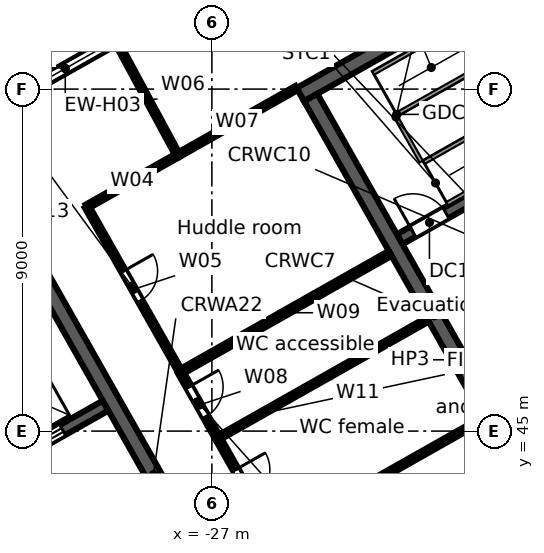
"""IFC4 building model, lengths in metres.
Left out: names, types, materials, properties, quantities, classifications, styles, units other than length and angle.
Written with IfcOpenShell. Run it as: python <this file> out.ifc"""

import sys

from ifc_helpers import new_model, si_unit, direction, frame, frame_2d, origin, place, context, subcontext, project, spatial, rectangle, extrude, element, fill, save


model = new_model("IFC4")
c1 = context("Model", 3, precision=1e-05, world=origin(), true_north=direction((0.0, 1.0)))
c2 = subcontext(c1, "Body", "Model", "MODEL_VIEW")
j1 = project(units=[si_unit("LENGTHUNIT", "METRE"), si_unit("PLANEANGLEUNIT", "RADIAN")], contexts=[c1])
p1 = place(None, origin())
s1 = spatial("IfcSite", under=j1, at=p1, CompositionType="ELEMENT")
p2 = place(p1, origin())
s2 = spatial("IfcBuilding", under=s1, at=p2, CompositionType="ELEMENT")
p3 = place(p2, frame((0.0, 0.0, 274.1)))
s3 = spatial("IfcBuildingStorey", under=s2, at=p3, CompositionType="ELEMENT", Elevation=274.1)
p4 = place(p3, frame((-58.732, 38.771, 0.0), z_axis=(0.0, 0.0, 1.0), x_axis=(0.870355615581, 0.492423702137, 0.0)))
e1 = element("IfcWall", 1, at=p4, inside=s3, PredefinedType="STANDARD", context=c2, shape_type="SweptSolid", body=[
    extrude(rectangle(XDim=64.052, YDim=0.25, at=frame_2d((32.026, 0.0))), origin(), (0.0, 0.0, 1.0), 3.52),
])
p5 = place(p4, frame((61.259, 0.0, 0.8)))
e2 = element("IfcOpeningElement", 2, at=p5, cuts=e1, PredefinedType="OPENING", context=c2, shape_type="SweptSolid", body=[
    extrude(rectangle(XDim=2.4, YDim=2.2, at=frame_2d((1.2, 1.1))), frame((0.0, 0.135, 0.0), z_axis=(0.0, -1.0, 0.0), x_axis=(1.0, 0.0, 0.0)), (0.0, 0.0, 1.0), 0.27),
])
p6 = place(p4, frame((58.216, 0.0, 0.8)))
e3 = element("IfcOpeningElement", 3, at=p6, cuts=e1, PredefinedType="OPENING", context=c2, shape_type="SweptSolid", body=[
    extrude(rectangle(XDim=2.4, YDim=2.2, at=frame_2d((1.2, 1.1))), frame((0.0, 0.135, 0.0), z_axis=(0.0, -1.0, 0.0), x_axis=(1.0, 0.0, 0.0)), (0.0, 0.0, 1.0), 0.27),
])
p7 = place(p4, frame((55.173, 0.0, 0.8)))
e4 = element("IfcOpeningElement", 4, at=p7, cuts=e1, PredefinedType="OPENING", context=c2, shape_type="SweptSolid", body=[
    extrude(rectangle(XDim=2.4, YDim=2.2, at=frame_2d((1.2, 1.1))), frame((0.0, 0.135, 0.0), z_axis=(0.0, -1.0, 0.0), x_axis=(1.0, 0.0, 0.0)), (0.0, 0.0, 1.0), 0.27),
])
p8 = place(p4, frame((52.129, 0.0, 0.8)))
e5 = element("IfcOpeningElement", 5, at=p8, cuts=e1, PredefinedType="OPENING", context=c2, shape_type="SweptSolid", body=[
    extrude(rectangle(XDim=2.4, YDim=2.2, at=frame_2d((1.2, 1.1))), frame((0.0, 0.135, 0.0), z_axis=(0.0, -1.0, 0.0), x_axis=(1.0, 0.0, 0.0)), (0.0, 0.0, 1.0), 0.27),
])
p9 = place(p4, frame((49.086, 0.0, 0.8)))
e6 = element("IfcOpeningElement", 6, at=p9, cuts=e1, PredefinedType="OPENING", context=c2, shape_type="SweptSolid", body=[
    extrude(rectangle(XDim=2.4, YDim=2.2, at=frame_2d((1.2, 1.1))), frame((0.0, 0.135, 0.0), z_axis=(0.0, -1.0, 0.0), x_axis=(1.0, 0.0, 0.0)), (0.0, 0.0, 1.0), 0.27),
])
p10 = place(p4, frame((46.043, 0.0, 0.8)))
e7 = element("IfcOpeningElement", 7, at=p10, cuts=e1, PredefinedType="OPENING", context=c2, shape_type="SweptSolid", body=[
    extrude(rectangle(XDim=2.4, YDim=2.2, at=frame_2d((1.2, 1.1))), frame((0.0, 0.135, 0.0), z_axis=(0.0, -1.0, 0.0), x_axis=(1.0, 0.0, 0.0)), (0.0, 0.0, 1.0), 0.27),
])
p11 = place(p4, frame((43.0, 0.0, 0.8)))
e8 = element("IfcOpeningElement", 8, at=p11, cuts=e1, PredefinedType="OPENING", context=c2, shape_type="SweptSolid", body=[
    extrude(rectangle(XDim=2.4, YDim=2.2, at=frame_2d((1.2, 1.1))), frame((0.0, 0.135, 0.0), z_axis=(0.0, -1.0, 0.0), x_axis=(1.0, 0.0, 0.0)), (0.0, 0.0, 1.0), 0.27),
])
p12 = place(p4, frame((39.956, 0.0, 0.8)))
e9 = element("IfcOpeningElement", 9, at=p12, cuts=e1, PredefinedType="OPENING", context=c2, shape_type="SweptSolid", body=[
    extrude(rectangle(XDim=2.4, YDim=2.2, at=frame_2d((1.2, 1.1))), frame((0.0, 0.135, 0.0), z_axis=(0.0, -1.0, 0.0), x_axis=(1.0, 0.0, 0.0)), (0.0, 0.0, 1.0), 0.27),
])
p13 = place(p4, frame((36.913, 0.0, 0.8)))
e10 = element("IfcOpeningElement", 10, at=p13, cuts=e1, PredefinedType="OPENING", context=c2, shape_type="SweptSolid", body=[
    extrude(rectangle(XDim=2.4, YDim=2.2, at=frame_2d((1.2, 1.1))), frame((0.0, 0.135, 0.0), z_axis=(0.0, -1.0, 0.0), x_axis=(1.0, 0.0, 0.0)), (0.0, 0.0, 1.0), 0.27),
])
p14 = place(p4, frame((33.87, 0.0, 0.8)))
e11 = element("IfcOpeningElement", 11, at=p14, cuts=e1, PredefinedType="OPENING", context=c2, shape_type="SweptSolid", body=[
    extrude(rectangle(XDim=2.4, YDim=2.2, at=frame_2d((1.2, 1.1))), frame((0.0, 0.135, 0.0), z_axis=(0.0, -1.0, 0.0), x_axis=(1.0, 0.0, 0.0)), (0.0, 0.0, 1.0), 0.27),
])
p15 = place(p4, frame((30.826, 0.0, 0.8)))
e12 = element("IfcOpeningElement", 12, at=p15, cuts=e1, PredefinedType="OPENING", context=c2, shape_type="SweptSolid", body=[
    extrude(rectangle(XDim=2.4, YDim=2.2, at=frame_2d((1.2, 1.1))), frame((0.0, 0.135, 0.0), z_axis=(0.0, -1.0, 0.0), x_axis=(1.0, 0.0, 0.0)), (0.0, 0.0, 1.0), 0.27),
])
p16 = place(p4, frame((27.783, 0.0, 0.8)))
e13 = element("IfcOpeningElement", 13, at=p16, cuts=e1, PredefinedType="OPENING", context=c2, shape_type="SweptSolid", body=[
    extrude(rectangle(XDim=2.4, YDim=2.2, at=frame_2d((1.2, 1.1))), frame((0.0, 0.135, 0.0), z_axis=(0.0, -1.0, 0.0), x_axis=(1.0, 0.0, 0.0)), (0.0, 0.0, 1.0), 0.27),
])
p17 = place(p4, frame((24.74, 0.0, 0.8)))
e14 = element("IfcOpeningElement", 14, at=p17, cuts=e1, PredefinedType="OPENING", context=c2, shape_type="SweptSolid", body=[
    extrude(rectangle(XDim=2.4, YDim=2.2, at=frame_2d((1.2, 1.1))), frame((0.0, 0.135, 0.0), z_axis=(0.0, -1.0, 0.0), x_axis=(1.0, 0.0, 0.0)), (0.0, 0.0, 1.0), 0.27),
])
p18 = place(p4, frame((21.696, 0.0, 0.8)))
e15 = element("IfcOpeningElement", 15, at=p18, cuts=e1, PredefinedType="OPENING", context=c2, shape_type="SweptSolid", body=[
    extrude(rectangle(XDim=2.4, YDim=2.2, at=frame_2d((1.2, 1.1))), frame((0.0, 0.135, 0.0), z_axis=(0.0, -1.0, 0.0), x_axis=(1.0, 0.0, 0.0)), (0.0, 0.0, 1.0), 0.27),
])
p19 = place(p4, frame((18.653, 0.0, 0.8)))
e16 = element("IfcOpeningElement", 16, at=p19, cuts=e1, PredefinedType="OPENING", context=c2, shape_type="SweptSolid", body=[
    extrude(rectangle(XDim=2.4, YDim=2.2, at=frame_2d((1.2, 1.1))), frame((0.0, 0.135, 0.0), z_axis=(0.0, -1.0, 0.0), x_axis=(1.0, 0.0, 0.0)), (0.0, 0.0, 1.0), 0.27),
])
p20 = place(p4, frame((15.61, 0.0, 0.8)))
e17 = element("IfcOpeningElement", 17, at=p20, cuts=e1, PredefinedType="OPENING", context=c2, shape_type="SweptSolid", body=[
    extrude(rectangle(XDim=2.4, YDim=2.2, at=frame_2d((1.2, 1.1))), frame((0.0, 0.135, 0.0), z_axis=(0.0, -1.0, 0.0), x_axis=(1.0, 0.0, 0.0)), (0.0, 0.0, 1.0), 0.27),
])
p21 = place(p4, frame((12.567, 0.0, 0.8)))
e18 = element("IfcOpeningElement", 18, at=p21, cuts=e1, PredefinedType="OPENING", context=c2, shape_type="SweptSolid", body=[
    extrude(rectangle(XDim=2.4, YDim=2.2, at=frame_2d((1.2, 1.1))), frame((0.0, 0.135, 0.0), z_axis=(0.0, -1.0, 0.0), x_axis=(1.0, 0.0, 0.0)), (0.0, 0.0, 1.0), 0.27),
])
p22 = place(p4, frame((9.523, 0.0, 0.8)))
e19 = element("IfcOpeningElement", 19, at=p22, cuts=e1, PredefinedType="OPENING", context=c2, shape_type="SweptSolid", body=[
    extrude(rectangle(XDim=2.4, YDim=2.2, at=frame_2d((1.2, 1.1))), frame((0.0, 0.135, 0.0), z_axis=(0.0, -1.0, 0.0), x_axis=(1.0, 0.0, 0.0)), (0.0, 0.0, 1.0), 0.27),
])
p23 = place(p4, frame((6.48, 0.0, 0.8)))
e20 = element("IfcOpeningElement", 20, at=p23, cuts=e1, PredefinedType="OPENING", context=c2, shape_type="SweptSolid", body=[
    extrude(rectangle(XDim=2.4, YDim=2.2, at=frame_2d((1.2, 1.1))), frame((0.0, 0.135, 0.0), z_axis=(0.0, -1.0, 0.0), x_axis=(1.0, 0.0, 0.0)), (0.0, 0.0, 1.0), 0.27),
])
p24 = place(p4, frame((3.437, 0.0, 0.8)))
e21 = element("IfcOpeningElement", 21, at=p24, cuts=e1, PredefinedType="OPENING", context=c2, shape_type="SweptSolid", body=[
    extrude(rectangle(XDim=2.4, YDim=2.2, at=frame_2d((1.2, 1.1))), frame((0.0, 0.135, 0.0), z_axis=(0.0, -1.0, 0.0), x_axis=(1.0, 0.0, 0.0)), (0.0, 0.0, 1.0), 0.27),
])
p25 = place(p4, frame((0.393, 0.0, 0.8)))
e22 = element("IfcOpeningElement", 22, at=p25, cuts=e1, PredefinedType="OPENING", context=c2, shape_type="SweptSolid", body=[
    extrude(rectangle(XDim=2.4, YDim=2.2, at=frame_2d((1.2, 1.1))), frame((0.0, 0.135, 0.0), z_axis=(0.0, -1.0, 0.0), x_axis=(1.0, 0.0, 0.0)), (0.0, 0.0, 1.0), 0.27),
])
p26 = place(p3, frame((-3.017, 46.293, 0.0), z_axis=(0.0, 0.0, 1.0), x_axis=(-0.870355474887, -0.492423950812, 0.0)))
e23 = element("IfcWall", 23, at=p26, inside=s3, PredefinedType="STANDARD", context=c2, shape_type="SweptSolid", body=[
    extrude(rectangle(XDim=40.34, YDim=0.25, at=frame_2d((20.17, 0.0))), origin(), (0.0, 0.0, 1.0), 3.52),
])
p27 = place(p26, frame((37.428, 0.0, 0.8)))
e24 = element("IfcOpeningElement", 24, at=p27, cuts=e23, PredefinedType="OPENING", context=c2, shape_type="SweptSolid", body=[
    extrude(rectangle(XDim=2.4, YDim=2.2, at=frame_2d((1.2, 1.1))), frame((0.0, 0.135, 0.0), z_axis=(0.0, -1.0, 0.0), x_axis=(1.0, 0.0, 0.0)), (0.0, 0.0, 1.0), 0.27),
])
p28 = place(p26, frame((34.372, 0.0, 0.0)))
e25 = element("IfcOpeningElement", 25, at=p28, cuts=e23, PredefinedType="OPENING", context=c2, shape_type="SweptSolid", body=[
    extrude(rectangle(XDim=1.8, YDim=2.4, at=frame_2d((0.9, 1.2))), frame((0.0, 0.135, 0.0), z_axis=(0.0, -1.0, 0.0), x_axis=(1.0, 0.0, 0.0)), (0.0, 0.0, 1.0), 0.27),
])
p29 = place(p26, frame((30.716, 0.0, 0.8)))
e26 = element("IfcOpeningElement", 26, at=p29, cuts=e23, PredefinedType="OPENING", context=c2, shape_type="SweptSolid", body=[
    extrude(rectangle(XDim=2.4, YDim=2.2, at=frame_2d((1.2, 1.1))), frame((0.0, 0.135, 0.0), z_axis=(0.0, -1.0, 0.0), x_axis=(1.0, 0.0, 0.0)), (0.0, 0.0, 1.0), 0.27),
])
p30 = place(p26, frame((27.36, 0.0, 0.8)))
e27 = element("IfcOpeningElement", 27, at=p30, cuts=e23, PredefinedType="OPENING", context=c2, shape_type="SweptSolid", body=[
    extrude(rectangle(XDim=2.4, YDim=2.2, at=frame_2d((1.2, 1.1))), frame((0.0, 0.135, 0.0), z_axis=(0.0, -1.0, 0.0), x_axis=(1.0, 0.0, 0.0)), (0.0, 0.0, 1.0), 0.27),
])
p31 = place(p26, frame((24.304, 0.0, 0.0)))
e28 = element("IfcOpeningElement", 28, at=p31, cuts=e23, PredefinedType="OPENING", context=c2, shape_type="SweptSolid", body=[
    extrude(rectangle(XDim=1.8, YDim=2.4, at=frame_2d((0.9, 1.2))), frame((0.0, 0.135, 0.0), z_axis=(0.0, -1.0, 0.0), x_axis=(1.0, 0.0, 0.0)), (0.0, 0.0, 1.0), 0.27),
])
p32 = place(p26, frame((20.648, 0.0, 0.8)))
e29 = element("IfcOpeningElement", 29, at=p32, cuts=e23, PredefinedType="OPENING", context=c2, shape_type="SweptSolid", body=[
    extrude(rectangle(XDim=2.4, YDim=2.2, at=frame_2d((1.2, 1.1))), frame((0.0, 0.135, 0.0), z_axis=(0.0, -1.0, 0.0), x_axis=(1.0, 0.0, 0.0)), (0.0, 0.0, 1.0), 0.27),
])
p33 = place(p26, frame((17.292, 0.0, 0.8)))
e30 = element("IfcOpeningElement", 30, at=p33, cuts=e23, PredefinedType="OPENING", context=c2, shape_type="SweptSolid", body=[
    extrude(rectangle(XDim=2.4, YDim=2.2, at=frame_2d((1.2, 1.1))), frame((0.0, 0.135, 0.0), z_axis=(0.0, -1.0, 0.0), x_axis=(1.0, 0.0, 0.0)), (0.0, 0.0, 1.0), 0.27),
])
p34 = place(p26, frame((14.236, 0.0, 0.0)))
e31 = element("IfcOpeningElement", 31, at=p34, cuts=e23, PredefinedType="OPENING", context=c2, shape_type="SweptSolid", body=[
    extrude(rectangle(XDim=1.8, YDim=2.4, at=frame_2d((0.9, 1.2))), frame((0.0, 0.135, 0.0), z_axis=(0.0, -1.0, 0.0), x_axis=(1.0, 0.0, 0.0)), (0.0, 0.0, 1.0), 0.27),
])
p35 = place(p26, frame((10.58, 0.0, 0.8)))
e32 = element("IfcOpeningElement", 32, at=p35, cuts=e23, PredefinedType="OPENING", context=c2, shape_type="SweptSolid", body=[
    extrude(rectangle(XDim=2.4, YDim=2.2, at=frame_2d((1.2, 1.1))), frame((0.0, 0.135, 0.0), z_axis=(0.0, -1.0, 0.0), x_axis=(1.0, 0.0, 0.0)), (0.0, 0.0, 1.0), 0.27),
])
p36 = place(p26, frame((7.224, 0.0, 0.8)))
e33 = element("IfcOpeningElement", 33, at=p36, cuts=e23, PredefinedType="OPENING", context=c2, shape_type="SweptSolid", body=[
    extrude(rectangle(XDim=2.4, YDim=2.2, at=frame_2d((1.2, 1.1))), frame((0.0, 0.135, 0.0), z_axis=(0.0, -1.0, 0.0), x_axis=(1.0, 0.0, 0.0)), (0.0, 0.0, 1.0), 0.27),
])
p37 = place(p26, frame((4.168, 0.0, 0.0)))
e34 = element("IfcOpeningElement", 34, at=p37, cuts=e23, PredefinedType="OPENING", context=c2, shape_type="SweptSolid", body=[
    extrude(rectangle(XDim=1.8, YDim=2.4, at=frame_2d((0.9, 1.2))), frame((0.0, 0.135, 0.0), z_axis=(0.0, -1.0, 0.0), x_axis=(1.0, 0.0, 0.0)), (0.0, 0.0, 1.0), 0.27),
])
p38 = place(p26, frame((0.512, 0.0, 0.8)))
e35 = element("IfcOpeningElement", 35, at=p38, cuts=e23, PredefinedType="OPENING", context=c2, shape_type="SweptSolid", body=[
    extrude(rectangle(XDim=2.4, YDim=2.2, at=frame_2d((1.2, 1.1))), frame((0.0, 0.135, 0.0), z_axis=(0.0, -1.0, 0.0), x_axis=(1.0, 0.0, 0.0)), (0.0, 0.0, 1.0), 0.27),
])
p39 = place(p3, frame((-37.282, 41.435, 0.0), z_axis=(0.0, 0.0, 1.0), x_axis=(0.870361315115, 0.492413628113, 0.0)))
e36 = element("IfcWall", 36, at=p39, inside=s3, PredefinedType="SOLIDWALL", context=c2, shape_type="SweptSolid", body=[
    extrude(rectangle(XDim=8.6, YDim=0.3, at=frame_2d((4.3, 0.0))), origin(), (0.0, 0.0, 1.0), 3.52),
])
p40 = place(p39, frame((0.65, 0.0, 0.0)))
e37 = element("IfcOpeningElement", 37, at=p40, cuts=e36, PredefinedType="OPENING", context=c2, shape_type="SweptSolid", body=[
    extrude(rectangle(XDim=1.1, YDim=2.1, at=frame_2d((0.55, 1.05))), frame((0.0, 0.16, 0.0), z_axis=(0.0, -1.0, 0.0), x_axis=(1.0, 0.0, 0.0)), (0.0, 0.0, 1.0), 0.32),
])
p41 = place(p39, frame((3.05, 0.0, 0.0)))
e38 = element("IfcOpeningElement", 38, at=p41, cuts=e36, PredefinedType="OPENING", context=c2, shape_type="SweptSolid", body=[
    extrude(rectangle(XDim=1.1, YDim=2.1, at=frame_2d((0.55, 1.05))), frame((0.0, 0.16, 0.0), z_axis=(0.0, -1.0, 0.0), x_axis=(1.0, 0.0, 0.0)), (0.0, 0.0, 1.0), 0.32),
])
p42 = place(p39, frame((6.2, 0.0, 0.0)))
e39 = element("IfcOpeningElement", 39, at=p42, cuts=e36, PredefinedType="OPENING", context=c2, shape_type="SweptSolid", body=[
    extrude(rectangle(XDim=1.1, YDim=2.1, at=frame_2d((0.55, 1.05))), frame((0.0, 0.16, 0.0), z_axis=(0.0, -1.0, 0.0), x_axis=(1.0, 0.0, 0.0)), (0.0, 0.0, 1.0), 0.32),
])
p43 = place(p3, frame((-31.79, 49.597, 0.0), z_axis=(0.0, 0.0, 1.0), x_axis=(0.492421663121, -0.870356769198, 0.0)))
e40 = element("IfcWall", 40, at=p43, inside=s3, PredefinedType="SOLIDWALL", context=c2, shape_type="SweptSolid", body=[
    extrude(rectangle(XDim=13.2, YDim=0.4, at=frame_2d((6.6, 0.0))), origin(), (0.0, 0.0, 1.0), 3.52),
])
p44 = place(p3, frame((-22.059, 50.047, 0.0), z_axis=(0.0, 0.0, 1.0), x_axis=(0.87035077051, 0.49243226567, 0.0)))
e41 = element("IfcWall", 41, at=p44, inside=s3, PredefinedType="SOLIDWALL", context=c2, shape_type="SweptSolid", body=[
    extrude(rectangle(XDim=7.4, YDim=0.3, at=frame_2d((3.7, 0.0))), origin(), (0.0, 0.0, 1.0), 3.52),
])
p45 = place(p44, frame((0.4, 0.0, 0.0)))
e42 = element("IfcOpeningElement", 42, at=p45, cuts=e41, PredefinedType="OPENING", context=c2, shape_type="SweptSolid", body=[
    extrude(rectangle(XDim=1.0, YDim=2.1, at=frame_2d((0.5, 1.05))), frame((0.0, 0.16, 0.0), z_axis=(0.0, -1.0, 0.0), x_axis=(1.0, 0.0, 0.0)), (0.0, 0.0, 1.0), 0.32),
])
p46 = place(p3, frame((-24.672, 53.854, 0.0), z_axis=(0.0, 0.0, 1.0), x_axis=(0.870353598469, 0.492427267353, 0.0)))
e43 = element("IfcWall", 43, at=p46, inside=s3, PredefinedType="SOLIDWALL", context=c2, shape_type="SweptSolid", body=[
    extrude(rectangle(XDim=15.0, YDim=0.4, at=frame_2d((7.5, 0.0))), origin(), (0.0, 0.0, 1.0), 3.52),
])
p47 = place(p3, frame((-24.4, 53.779, 0.0), z_axis=(0.0, 0.0, 1.0), x_axis=(0.492421663121, -0.870356769198, 0.0)))
e44 = element("IfcWall", 44, at=p47, inside=s3, PredefinedType="SOLIDWALL", context=c2, shape_type="SweptSolid", body=[
    extrude(rectangle(XDim=13.2, YDim=0.4, at=frame_2d((6.6, 0.0))), origin(), (0.0, 0.0, 1.0), 3.52),
])
p48 = place(p3, frame((-30.289, 50.906, 0.0), z_axis=(0.0, 0.0, 1.0), x_axis=(0.870344460795, 0.492443417626, 0.0)))
e45 = element("IfcWall", 45, at=p48, inside=s3, PredefinedType="PARTITIONING", context=c2, shape_type="SweptSolid", body=[
    extrude(rectangle(XDim=2.75, YDim=0.125, at=frame_2d((1.375, 0.0))), origin(), (0.0, 0.0, 1.0), 3.52),
])
p49 = place(p3, frame((-30.289, 50.906, 0.0), z_axis=(0.0, 0.0, 1.0), x_axis=(0.492406341242, -0.870365437678, 0.0)))
e46 = element("IfcWall", 46, at=p49, inside=s3, PredefinedType="PARTITIONING", context=c2, shape_type="SweptSolid", body=[
    extrude(rectangle(XDim=5.0, YDim=0.125, at=frame_2d((2.5, 0.0))), origin(), (0.0, 0.0, 1.0), 3.52),
])
p50 = place(p49, frame((1.95, 0.0, 0.0)))
e47 = element("IfcOpeningElement", 47, at=p50, cuts=e46, PredefinedType="OPENING", context=c2, shape_type="SweptSolid", body=[
    extrude(rectangle(XDim=0.9, YDim=2.1, at=frame_2d((0.45, 1.05))), frame((0.0, 0.073, 0.0), z_axis=(0.0, -1.0, 0.0), x_axis=(1.0, 0.0, 0.0)), (0.0, 0.0, 1.0), 0.145),
])
p51 = place(p3, frame((-29.474, 55.181, 0.0), z_axis=(0.0, 0.0, 1.0), x_axis=(0.475344759365, -0.879799613403, 0.0)))
e48 = element("IfcWall", 48, at=p51, inside=s3, PredefinedType="PARTITIONING", context=c2, shape_type="SweptSolid", body=[
    extrude(rectangle(XDim=3.32, YDim=0.125, at=frame_2d((1.66, 0.0))), origin(), (0.0, 0.0, 1.0), 2.888),
])
p52 = place(p3, frame((-27.896, 52.26, 0.0), z_axis=(0.0, 0.0, 1.0), x_axis=(0.870352535776, 0.492429145632, 0.0)))
e49 = element("IfcWall", 49, at=p52, inside=s3, PredefinedType="PARTITIONING", context=c2, shape_type="SweptSolid", body=[
    extrude(rectangle(XDim=3.591, YDim=0.125, at=frame_2d((1.795, 0.0))), origin(), (0.0, 0.0, 1.0), 2.792),
])
p53 = place(p3, frame((-27.827, 46.554, 0.0), z_axis=(0.0, 0.0, 1.0), x_axis=(0.492374954878, -0.870383193662, 0.0)))
e50 = element("IfcWall", 50, at=p53, inside=s3, PredefinedType="PARTITIONING", context=c2, shape_type="SweptSolid", body=[
    extrude(rectangle(XDim=2.0, YDim=0.15, at=frame_2d((1.0, 0.0))), origin(), (0.0, 0.0, 1.0), 2.792),
])
p54 = place(p53, frame((0.45, 0.0, 0.0)))
e51 = element("IfcOpeningElement", 51, at=p54, cuts=e50, PredefinedType="OPENING", context=c2, shape_type="SweptSolid", body=[
    extrude(rectangle(XDim=0.9, YDim=2.1, at=frame_2d((0.45, 1.05))), frame((0.0, 0.085, 0.0), z_axis=(0.0, -1.0, 0.0), x_axis=(1.0, 0.0, 0.0)), (0.0, 0.0, 1.0), 0.17),
])
p55 = place(p3, frame((-27.827, 46.554, 0.0), z_axis=(0.0, 0.0, 1.0), x_axis=(0.870339695563, 0.492451839602, 0.0)))
e52 = element("IfcWall", 52, at=p55, inside=s3, PredefinedType="PARTITIONING", context=c2, shape_type="SweptSolid", body=[
    extrude(rectangle(XDim=6.34, YDim=0.15, at=frame_2d((3.17, 0.0))), origin(), (0.0, 0.0, 1.0), 2.792),
])
p56 = place(p3, frame((-26.842, 44.813, 0.0), z_axis=(0.0, 0.0, 1.0), x_axis=(0.492365617434, -0.870388475779, 0.0)))
e53 = element("IfcWall", 53, at=p56, inside=s3, PredefinedType="PARTITIONING", context=c2, shape_type="SweptSolid", body=[
    extrude(rectangle(XDim=3.0, YDim=0.15, at=frame_2d((1.5, 0.0))), origin(), (0.0, 0.0, 1.0), 2.792),
])
p57 = place(p56, frame((0.95, 0.0, 0.0)))
e54 = element("IfcOpeningElement", 54, at=p57, cuts=e53, PredefinedType="OPENING", context=c2, shape_type="SweptSolid", body=[
    extrude(rectangle(XDim=0.9, YDim=2.1, at=frame_2d((0.45, 1.05))), frame((0.0, 0.085, 0.0), z_axis=(0.0, -1.0, 0.0), x_axis=(1.0, 0.0, 0.0)), (0.0, 0.0, 1.0), 0.17),
])
p58 = place(p3, frame((-26.842, 44.813, 0.0), z_axis=(0.0, 0.0, 1.0), x_axis=(0.870283015025, 0.492552001071, 0.0)))
e55 = element("IfcWall", 55, at=p58, inside=s3, PredefinedType="PARTITIONING", context=c2, shape_type="SweptSolid", body=[
    extrude(rectangle(XDim=6.341, YDim=0.125, at=frame_2d((3.17, 0.0))), origin(), (0.0, 0.0, 1.0), 2.792),
])
p59 = place(p3, frame((-25.365, 42.202, 0.0), z_axis=(0.0, 0.0, 1.0), x_axis=(0.870320373616, 0.492485986875, 0.0)))
e56 = element("IfcWall", 56, at=p59, inside=s3, PredefinedType="PARTITIONING", context=c2, shape_type="SweptSolid", body=[
    extrude(rectangle(XDim=6.341, YDim=0.125, at=frame_2d((3.171, 0.0))), origin(), (0.0, 0.0, 1.0), 3.52),
])
p60 = place(p15, origin())
e57 = element("IfcWindow", 57, at=p60, inside=s3, PartitioningType="SINGLE_PANEL", PredefinedType="WINDOW", context=c2, shape_type="SweptSolid", body=[
    extrude(rectangle(XDim=2.4, YDim=2.2, at=frame_2d((1.2, 1.1))), frame((0.0, 0.03, 0.0), z_axis=(0.0, -1.0, 0.0), x_axis=(1.0, 0.0, 0.0)), (0.0, 0.0, 1.0), 0.06),
])
fill(e12, e57)
p61 = place(p42, origin())
e58 = element("IfcDoor", 58, at=p61, inside=s3, OperationType="DOUBLE_DOOR_SLIDING", PredefinedType="DOOR", context=c2, shape_type="SweptSolid", body=[
    extrude(rectangle(XDim=1.1, YDim=2.1, at=frame_2d((0.55, 1.05))), frame((0.0, 0.025, 0.0), z_axis=(0.0, -1.0, 0.0), x_axis=(1.0, 0.0, 0.0)), (0.0, 0.0, 1.0), 0.05),
])
fill(e39, e58)
p62 = place(p45, origin())
e59 = element("IfcDoor", 59, at=p62, inside=s3, OperationType="SINGLE_SWING_LEFT", PredefinedType="DOOR", context=c2, shape_type="SweptSolid", body=[
    extrude(rectangle(XDim=1.0, YDim=2.1, at=frame_2d((0.5, 1.05))), frame((0.0, 0.025, 0.0), z_axis=(0.0, -1.0, 0.0), x_axis=(1.0, 0.0, 0.0)), (0.0, 0.0, 1.0), 0.05),
])
fill(e42, e59)
p63 = place(p50, origin())
e60 = element("IfcDoor", 60, at=p63, inside=s3, OperationType="SINGLE_SWING_LEFT", PredefinedType="DOOR", context=c2, shape_type="SweptSolid", body=[
    extrude(rectangle(XDim=0.9, YDim=2.1, at=frame_2d((0.45, 1.05))), frame((0.0, 0.025, 0.0), z_axis=(0.0, -1.0, 0.0), x_axis=(1.0, 0.0, 0.0)), (0.0, 0.0, 1.0), 0.05),
])
fill(e47, e60)
p64 = place(p57, origin())
e61 = element("IfcDoor", 61, at=p64, inside=s3, OperationType="SINGLE_SWING_LEFT", PredefinedType="DOOR", context=c2, shape_type="SweptSolid", body=[
    extrude(rectangle(XDim=0.9, YDim=2.1, at=frame_2d((0.45, 1.05))), frame((0.0, 0.025, 0.0), z_axis=(0.0, -1.0, 0.0), x_axis=(1.0, 0.0, 0.0)), (0.0, 0.0, 1.0), 0.05),
])
fill(e54, e61)
p65 = place(p54, origin())
e62 = element("IfcDoor", 62, at=p65, inside=s3, OperationType="SINGLE_SWING_LEFT", PredefinedType="DOOR", context=c2, shape_type="SweptSolid", body=[
    extrude(rectangle(XDim=0.9, YDim=2.1, at=frame_2d((0.45, 1.05))), frame((0.0, 0.025, 0.0), z_axis=(0.0, -1.0, 0.0), x_axis=(1.0, 0.0, 0.0)), (0.0, 0.0, 1.0), 0.05),
])
fill(e51, e62)
save(model, sys.argv[1])
